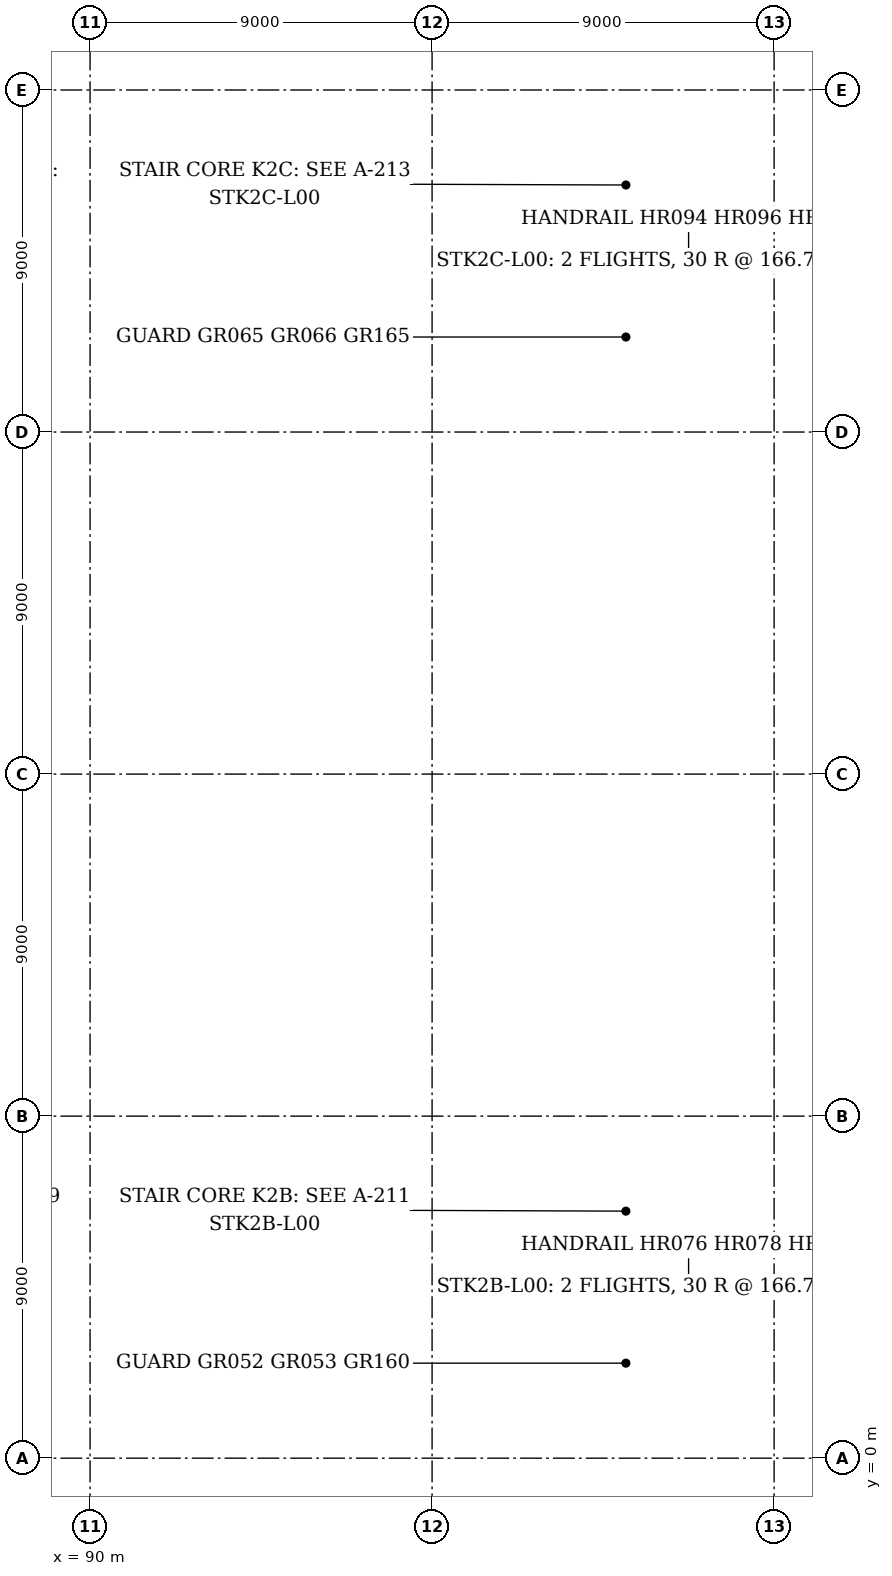
"""IFC4 building model, lengths in metres.
Left out: names, types, materials, properties, quantities, classifications, styles, units other than length and angle.
Written with IfcOpenShell. Run it as: python <this file> out.ifc"""

import sys

from ifc_helpers import new_model, si_unit, direction, frame, frame_2d, origin, origin_2d, place, context, subcontext, project, spatial, rectangle, hollow_rectangle, hollow_circle, i_section, extrude, element, fill, save


model = new_model("IFC4")
c1 = context("Model", 3, precision=1e-05, world=origin(), true_north=direction((0.0, 1.0)))
c2 = subcontext(c1, "Body", "Model", "MODEL_VIEW")
j1 = project(units=[si_unit("LENGTHUNIT", "METRE"), si_unit("PLANEANGLEUNIT", "RADIAN")], contexts=[c1])
p1 = place(None, origin())
s1 = spatial("IfcSite", under=j1, at=p1, CompositionType="ELEMENT")
p2 = place(p1, origin())
s2 = spatial("IfcBuilding", under=s1, at=p2, CompositionType="ELEMENT")
p3 = place(p2, origin())
s3 = spatial("IfcBuildingStorey", under=s2, at=p3, CompositionType="ELEMENT", Elevation=0.0)
p4 = place(p3, frame((90.0, 0.0, 0.0), z_axis=(0.0, 0.0, 1.0), x_axis=(1.0, 0.0, 0.0)))
e1 = element("IfcColumn", 1, at=p4, inside=s3, PredefinedType="COLUMN", context=c2, shape_type="SweptSolid", body=[
    extrude(hollow_rectangle(XDim=0.3, YDim=0.3, WallThickness=0.016, InnerFilletRadius=0.024, OuterFilletRadius=0.04, at=origin_2d()), origin(), (0.0, 0.0, 1.0), 5.0),
])
p5 = place(p3, frame((99.0, 0.0, 0.0), z_axis=(0.0, 0.0, 1.0), x_axis=(1.0, 0.0, 0.0)))
e2 = element("IfcColumn", 2, at=p5, inside=s3, PredefinedType="COLUMN", context=c2, shape_type="SweptSolid", body=[
    extrude(hollow_rectangle(XDim=0.35, YDim=0.35, WallThickness=0.016, InnerFilletRadius=0.024, OuterFilletRadius=0.04, at=origin_2d()), origin(), (0.0, 0.0, 1.0), 5.0),
])
for number, where, z_axis, x_axis in (
    (3, (90.0, 9.0, 0.0), (0.0, 0.0, 1.0), (1.0, 0.0, 0.0)),
    (4, (99.0, 9.0, 0.0), (0.0, 0.0, 1.0), (1.0, 0.0, 0.0)),
    (5, (99.0, 18.0, 0.0), (0.0, 0.0, 1.0), (1.0, 0.0, 0.0)),
):
    element("IfcColumn", number, at=place(p3, frame(where, z_axis=z_axis, x_axis=x_axis)), inside=s3, PredefinedType="COLUMN", context=c2, shape_type="SweptSolid", body=[
        extrude(hollow_circle(Radius=0.203, WallThickness=0.013, at=origin_2d()), origin(), (0.0, 0.0, 1.0), 5.0),
    ])
p6 = place(p3, frame((108.0, 18.0, 0.0), z_axis=(0.0, 0.0, 1.0), x_axis=(1.0, 0.0, 0.0)))
e6 = element("IfcColumn", 6, at=p6, inside=s3, PredefinedType="COLUMN", context=c2, shape_type="SweptSolid", body=[
    extrude(hollow_rectangle(XDim=0.35, YDim=0.35, WallThickness=0.016, InnerFilletRadius=0.024, OuterFilletRadius=0.04, at=origin_2d()), origin(), (0.0, 0.0, 1.0), 5.0),
])
for number, where, z_axis, x_axis in (
    (7, (90.0, 27.0, 0.0), (0.0, 0.0, 1.0), (1.0, 0.0, 0.0)),
    (8, (99.0, 27.0, 0.0), (0.0, 0.0, 1.0), (1.0, 0.0, 0.0)),
):
    element("IfcColumn", number, at=place(p3, frame(where, z_axis=z_axis, x_axis=x_axis)), inside=s3, PredefinedType="COLUMN", context=c2, shape_type="SweptSolid", body=[
        extrude(hollow_circle(Radius=0.203, WallThickness=0.013, at=origin_2d()), origin(), (0.0, 0.0, 1.0), 5.0),
    ])
p7 = place(p3, frame((90.0, 36.0, 0.0), z_axis=(0.0, 0.0, 1.0), x_axis=(1.0, 0.0, 0.0)))
e9 = element("IfcColumn", 9, at=p7, inside=s3, PredefinedType="COLUMN", context=c2, shape_type="SweptSolid", body=[
    extrude(i_section(OverallWidth=0.311, OverallDepth=0.327, WebThickness=0.016, FlangeThickness=0.025, FilletRadius=0.017, at=origin_2d()), origin(), (0.0, 0.0, 1.0), 5.0),
])
p8 = place(p3, frame((99.0, 36.0, 0.0), z_axis=(0.0, 0.0, 1.0), x_axis=(1.0, 0.0, 0.0)))
e10 = element("IfcColumn", 10, at=p8, inside=s3, PredefinedType="COLUMN", context=c2, shape_type="SweptSolid", body=[
    extrude(i_section(OverallWidth=0.35, OverallDepth=0.339, WebThickness=0.025, FlangeThickness=0.032, at=origin_2d()), origin(), (0.0, 0.0, 1.0), 5.0),
])
p9 = place(p3, frame((107.935, 36.0, 0.0), z_axis=(0.0, 0.0, 1.0), x_axis=(0.0, 1.0, 0.0)))
e11 = element("IfcWall", 11, at=p9, inside=s3, PredefinedType="SOLIDWALL", context=c2, shape_type="SweptSolid", body=[
    extrude(rectangle(XDim=8.85, YDim=0.25, at=frame_2d((4.425, 0.0))), origin(), (0.0, 0.0, 1.0), 4.05),
])
p10 = place(p3, frame((107.85, 10.562, 0.0), z_axis=(0.0, 0.0, 1.0), x_axis=(0.0, 1.0, 0.0)))
e12 = element("IfcWall", 12, at=p10, inside=s3, PredefinedType="SOLIDWALL", context=c2, shape_type="SweptSolid", body=[
    extrude(rectangle(XDim=5.7, YDim=0.2, at=frame_2d((2.85, 0.0))), origin(), (0.0, 0.0, 1.0), 4.835),
])
p11 = place(p10, frame((0.3, 0.0, 0.0)))
e13 = element("IfcOpeningElement", 13, at=p11, cuts=e12, PredefinedType="OPENING", context=c2, shape_type="SweptSolid", body=[
    extrude(rectangle(XDim=2.4, YDim=2.4, at=frame_2d((1.2, 1.2))), frame((0.0, 0.11, 0.0), z_axis=(0.0, -1.0, 0.0), x_axis=(1.0, 0.0, 0.0)), (0.0, 0.0, 1.0), 0.22),
])
p12 = place(p10, frame((3.0, 0.0, 0.0)))
e14 = element("IfcOpeningElement", 14, at=p12, cuts=e12, PredefinedType="OPENING", context=c2, shape_type="SweptSolid", body=[
    extrude(rectangle(XDim=2.4, YDim=2.4, at=frame_2d((1.2, 1.2))), frame((0.0, 0.11, 0.0), z_axis=(0.0, -1.0, 0.0), x_axis=(1.0, 0.0, 0.0)), (0.0, 0.0, 1.0), 0.22),
])
p13 = place(p3, frame((103.5, 0.15, 0.0), z_axis=(0.0, 0.0, 1.0), x_axis=(1.0, 0.0, 0.0)))
e15 = element("IfcWall", 15, at=p13, inside=s3, PredefinedType="SOLIDWALL", context=c2, shape_type="SweptSolid", body=[
    extrude(rectangle(XDim=4.5, YDim=0.3, at=frame_2d((2.25, 0.0))), origin(), (0.0, 0.0, 1.0), 5.0),
])
p14 = place(p3, frame((107.85, 0.3, 0.0), z_axis=(0.0, 0.0, 1.0), x_axis=(0.0, 1.0, 0.0)))
e16 = element("IfcWall", 16, at=p14, inside=s3, PredefinedType="SOLIDWALL", context=c2, shape_type="SweptSolid", body=[
    extrude(rectangle(XDim=8.4, YDim=0.3, at=frame_2d((4.2, 0.0))), origin(), (0.0, 0.0, 1.0), 5.0),
])
p15 = place(p14, frame((3.25, 0.0, 0.0)))
e17 = element("IfcOpeningElement", 17, at=p15, cuts=e16, PredefinedType="OPENING", context=c2, shape_type="SweptSolid", body=[
    extrude(rectangle(XDim=1.8, YDim=2.1, at=frame_2d((0.9, 1.05))), frame((0.0, 0.16, 0.0), z_axis=(0.0, -1.0, 0.0), x_axis=(1.0, 0.0, 0.0)), (0.0, 0.0, 1.0), 0.32),
])
p16 = place(p3, frame((103.5, 8.85, 0.0), z_axis=(0.0, 0.0, 1.0), x_axis=(1.0, 0.0, 0.0)))
e18 = element("IfcWall", 18, at=p16, inside=s3, PredefinedType="SOLIDWALL", context=c2, shape_type="SweptSolid", body=[
    extrude(rectangle(XDim=4.5, YDim=0.3, at=frame_2d((2.25, 0.0))), origin(), (0.0, 0.0, 1.0), 5.0),
])
p17 = place(p16, frame((2.95, 0.0, 0.0)))
e19 = element("IfcOpeningElement", 19, at=p17, cuts=e18, PredefinedType="OPENING", context=c2, shape_type="SweptSolid", body=[
    extrude(rectangle(XDim=1.2, YDim=2.1, at=frame_2d((0.6, 1.05))), frame((0.0, 0.16, 0.0), z_axis=(0.0, -1.0, 0.0), x_axis=(1.0, 0.0, 0.0)), (0.0, 0.0, 1.0), 0.32),
])
p18 = place(p3, frame((103.65, 0.3, 0.0), z_axis=(0.0, 0.0, 1.0), x_axis=(0.0, 1.0, 0.0)))
e20 = element("IfcWall", 20, at=p18, inside=s3, PredefinedType="SOLIDWALL", context=c2, shape_type="SweptSolid", body=[
    extrude(rectangle(XDim=8.4, YDim=0.3, at=frame_2d((4.2, 0.0))), origin(), (0.0, 0.0, 1.0), 5.0),
])
p19 = place(p3, frame((103.5, 27.15, 0.0), z_axis=(0.0, 0.0, 1.0), x_axis=(1.0, 0.0, 0.0)))
e21 = element("IfcWall", 21, at=p19, inside=s3, PredefinedType="SOLIDWALL", context=c2, shape_type="SweptSolid", body=[
    extrude(rectangle(XDim=4.5, YDim=0.3, at=frame_2d((2.25, 0.0))), origin(), (0.0, 0.0, 1.0), 5.0),
])
p20 = place(p3, frame((107.85, 27.3, 0.0), z_axis=(0.0, 0.0, 1.0), x_axis=(0.0, 1.0, 0.0)))
e22 = element("IfcWall", 22, at=p20, inside=s3, PredefinedType="SOLIDWALL", context=c2, shape_type="SweptSolid", body=[
    extrude(rectangle(XDim=8.4, YDim=0.3, at=frame_2d((4.2, 0.0))), origin(), (0.0, 0.0, 1.0), 5.0),
])
p21 = place(p20, frame((3.25, 0.0, 0.0)))
e23 = element("IfcOpeningElement", 23, at=p21, cuts=e22, PredefinedType="OPENING", context=c2, shape_type="SweptSolid", body=[
    extrude(rectangle(XDim=1.8, YDim=2.1, at=frame_2d((0.9, 1.05))), frame((0.0, 0.16, 0.0), z_axis=(0.0, -1.0, 0.0), x_axis=(1.0, 0.0, 0.0)), (0.0, 0.0, 1.0), 0.32),
])
p22 = place(p3, frame((103.5, 35.85, 0.0), z_axis=(0.0, 0.0, 1.0), x_axis=(1.0, 0.0, 0.0)))
e24 = element("IfcWall", 24, at=p22, inside=s3, PredefinedType="SOLIDWALL", context=c2, shape_type="SweptSolid", body=[
    extrude(rectangle(XDim=4.5, YDim=0.3, at=frame_2d((2.25, 0.0))), origin(), (0.0, 0.0, 1.0), 5.0),
])
p23 = place(p22, frame((1.35, 0.0, 0.0)))
e25 = element("IfcOpeningElement", 25, at=p23, cuts=e24, PredefinedType="OPENING", context=c2, shape_type="SweptSolid", body=[
    extrude(rectangle(XDim=1.8, YDim=2.1, at=frame_2d((0.9, 1.05))), frame((0.0, 0.16, 0.0), z_axis=(0.0, -1.0, 0.0), x_axis=(1.0, 0.0, 0.0)), (0.0, 0.0, 1.0), 0.32),
])
p24 = place(p3, frame((103.65, 27.3, 0.0), z_axis=(0.0, 0.0, 1.0), x_axis=(0.0, 1.0, 0.0)))
e26 = element("IfcWall", 26, at=p24, inside=s3, PredefinedType="SOLIDWALL", context=c2, shape_type="SweptSolid", body=[
    extrude(rectangle(XDim=8.4, YDim=0.3, at=frame_2d((4.2, 0.0))), origin(), (0.0, 0.0, 1.0), 5.0),
])
p25 = place(p3, frame((93.0, 9.0, 0.0), z_axis=(0.0, 0.0, 1.0), x_axis=(1.0, 0.0, 0.0)))
e27 = element("IfcWall", 27, at=p25, inside=s3, PredefinedType="PARTITIONING", context=c2, shape_type="SweptSolid", body=[
    extrude(rectangle(XDim=3.0, YDim=0.125, at=frame_2d((1.5, 0.0))), origin(), (0.0, 0.0, 1.0), 4.228),
])
p26 = place(p3, frame((93.0, 27.0, 0.0), z_axis=(0.0, 0.0, 1.0), x_axis=(1.0, 0.0, 0.0)))
e28 = element("IfcWall", 28, at=p26, inside=s3, PredefinedType="PARTITIONING", context=c2, shape_type="SweptSolid", body=[
    extrude(rectangle(XDim=3.0, YDim=0.15, at=frame_2d((1.5, 0.0))), origin(), (0.0, 0.0, 1.0), 4.228),
])
p27 = place(p26, frame((0.95, 0.0, 0.0)))
e29 = element("IfcOpeningElement", 29, at=p27, cuts=e28, PredefinedType="OPENING", context=c2, shape_type="SweptSolid", body=[
    extrude(rectangle(XDim=1.0, YDim=2.1, at=frame_2d((0.5, 1.05))), frame((0.0, 0.085, 0.0), z_axis=(0.0, -1.0, 0.0), x_axis=(1.0, 0.0, 0.0)), (0.0, 0.0, 1.0), 0.17),
])
p28 = place(p3, frame((81.203, 27.0, 0.0), z_axis=(0.0, 0.0, 1.0), x_axis=(1.0, 0.0, 0.0)))
e30 = element("IfcWall", 30, at=p28, inside=s3, PredefinedType="PARTITIONING", context=c2, shape_type="SweptSolid", body=[
    extrude(rectangle(XDim=8.594, YDim=0.125, at=frame_2d((4.297, 0.0))), origin(), (0.0, 0.0, 1.0), 4.228),
])
p29 = place(p28, frame((3.75, 0.0, 0.0)))
e31 = element("IfcOpeningElement", 31, at=p29, cuts=e30, PredefinedType="OPENING", context=c2, shape_type="SweptSolid", body=[
    extrude(rectangle(XDim=1.0, YDim=2.1, at=frame_2d((0.5, 1.05))), frame((0.0, 0.073, 0.0), z_axis=(0.0, -1.0, 0.0), x_axis=(1.0, 0.0, 0.0)), (0.0, 0.0, 1.0), 0.145),
])
p30 = place(p3, frame((99.203, 9.0, 0.0), z_axis=(0.0, 0.0, 1.0), x_axis=(1.0, 0.0, 0.0)))
e32 = element("IfcWall", 32, at=p30, inside=s3, PredefinedType="PARTITIONING", context=c2, shape_type="SweptSolid", body=[
    extrude(rectangle(XDim=4.297, YDim=0.2, at=frame_2d((2.148, 0.0))), origin(), (0.0, 0.0, 1.0), 4.302),
])
p31 = place(p30, frame((1.25, 0.0, 0.0)))
e33 = element("IfcOpeningElement", 33, at=p31, cuts=e32, PredefinedType="OPENING", context=c2, shape_type="SweptSolid", body=[
    extrude(rectangle(XDim=1.8, YDim=2.1, at=frame_2d((0.9, 1.05))), frame((0.0, 0.11, 0.0), z_axis=(0.0, -1.0, 0.0), x_axis=(1.0, 0.0, 0.0)), (0.0, 0.0, 1.0), 0.22),
])
p32 = place(p3, frame((99.0, 0.175, 0.0), z_axis=(0.0, 0.0, 1.0), x_axis=(0.0, 1.0, 0.0)))
e34 = element("IfcWall", 34, at=p32, inside=s3, PredefinedType="PARTITIONING", context=c2, shape_type="SweptSolid", body=[
    extrude(rectangle(XDim=8.622, YDim=0.2, at=frame_2d((4.311, 0.0))), origin(), (0.0, 0.0, 1.0), 4.302),
])
p33 = place(p3, frame((99.0, 30.017, 0.0), z_axis=(0.0, 0.0, 1.0), x_axis=(0.0, 1.0, 0.0)))
e35 = element("IfcWall", 35, at=p33, inside=s3, PredefinedType="PARTITIONING", context=c2, shape_type="SweptSolid", body=[
    extrude(rectangle(XDim=3.0, YDim=0.15, at=frame_2d((1.5, 0.0))), origin(), (0.0, 0.0, 1.0), 4.302),
])
p34 = place(p3, frame((90.156, 36.0, 0.0), z_axis=(0.0, 0.0, 1.0), x_axis=(1.0, 0.0, 0.0)))
e36 = element("IfcWall", 36, at=p34, inside=s3, PredefinedType="PARTITIONING", context=c2, shape_type="SweptSolid", body=[
    extrude(rectangle(XDim=8.669, YDim=0.15, at=frame_2d((4.335, 0.0))), origin(), (0.0, 0.0, 1.0), 3.958),
])
p35 = place(p3, frame((90.0, 27.203, 0.0), z_axis=(0.0, 0.0, 1.0), x_axis=(0.0, 1.0, 0.0)))
e37 = element("IfcWall", 37, at=p35, inside=s3, PredefinedType="PARTITIONING", context=c2, shape_type="SweptSolid", body=[
    extrude(rectangle(XDim=1.597, YDim=0.125, at=frame_2d((0.798, 0.0))), origin(), (0.0, 0.0, 1.0), 4.302),
])
p36 = place(p3, frame((90.0, 28.8, 0.0), z_axis=(0.0, 0.0, 1.0), x_axis=(0.0, 1.0, 0.0)))
e38 = element("IfcWall", 38, at=p36, inside=s3, PredefinedType="PARTITIONING", context=c2, shape_type="SweptSolid", body=[
    extrude(rectangle(XDim=7.036, YDim=0.075, at=frame_2d((3.518, 0.0))), origin(), (0.0, 0.0, 1.0), 4.302),
])
p37 = place(p3, frame((99.175, 36.0, 0.0), z_axis=(0.0, 0.0, 1.0), x_axis=(1.0, 0.0, 0.0)))
e39 = element("IfcWall", 39, at=p37, inside=s3, PredefinedType="PARTITIONING", context=c2, shape_type="SweptSolid", body=[
    extrude(rectangle(XDim=4.325, YDim=0.15, at=frame_2d((2.163, 0.0))), origin(), (0.0, 0.0, 1.0), 3.958),
])
p38 = place(p3, frame((87.0, 36.0, 0.0), z_axis=(0.0, 0.0, 1.0), x_axis=(1.0, 0.0, 0.0)))
e40 = element("IfcWall", 40, at=p38, inside=s3, PredefinedType="PARTITIONING", context=c2, shape_type="SweptSolid", body=[
    extrude(rectangle(XDim=2.844, YDim=0.15, at=frame_2d((1.422, 0.0))), origin(), (0.0, 0.0, 1.0), 3.958),
])
p39 = place(p3, frame((87.0, 28.8, 0.0), z_axis=(0.0, 0.0, 1.0), x_axis=(1.0, 0.0, 0.0)))
e41 = element("IfcWall", 41, at=p39, inside=s3, PredefinedType="PARTITIONING", context=c2, shape_type="SweptSolid", body=[
    extrude(rectangle(XDim=3.0, YDim=0.075, at=frame_2d((1.5, 0.0))), origin(), (0.0, 0.0, 1.0), 4.302),
])
p40 = place(p39, frame((0.95, 0.0, 0.0)))
e42 = element("IfcOpeningElement", 42, at=p40, cuts=e41, PredefinedType="OPENING", context=c2, shape_type="SweptSolid", body=[
    extrude(rectangle(XDim=1.0, YDim=2.1, at=frame_2d((0.5, 1.05))), frame((0.0, 0.047, 0.0), z_axis=(0.0, -1.0, 0.0), x_axis=(1.0, 0.0, 0.0)), (0.0, 0.0, 1.0), 0.095),
])
p41 = place(p11, frame((2.4, 0.0, 0.0), z_axis=(0.0, 0.0, 1.0), x_axis=(-1.0, 0.0, 0.0)))
e43 = element("IfcDoor", 43, at=p41, inside=s3, OperationType="DOUBLE_DOOR_SINGLE_SWING", PredefinedType="DOOR", context=c2, shape_type="SweptSolid", body=[
    extrude(rectangle(XDim=2.4, YDim=2.4, at=frame_2d((1.2, 1.2))), frame((0.0, 0.025, 0.0), z_axis=(0.0, -1.0, 0.0), x_axis=(1.0, 0.0, 0.0)), (0.0, 0.0, 1.0), 0.05),
])
fill(e13, e43)
p42 = place(p12, frame((2.4, 0.0, 0.0), z_axis=(0.0, 0.0, 1.0), x_axis=(-1.0, 0.0, 0.0)))
e44 = element("IfcDoor", 44, at=p42, inside=s3, OperationType="DOUBLE_DOOR_SINGLE_SWING", PredefinedType="DOOR", context=c2, shape_type="SweptSolid", body=[
    extrude(rectangle(XDim=2.4, YDim=2.4, at=frame_2d((1.2, 1.2))), frame((0.0, 0.025, 0.0), z_axis=(0.0, -1.0, 0.0), x_axis=(1.0, 0.0, 0.0)), (0.0, 0.0, 1.0), 0.05),
])
fill(e14, e44)
p43 = place(p15, frame((1.8, 0.0, 0.0), z_axis=(0.0, 0.0, 1.0), x_axis=(-1.0, 0.0, 0.0)))
e45 = element("IfcDoor", 45, at=p43, inside=s3, OperationType="DOUBLE_DOOR_SINGLE_SWING", PredefinedType="DOOR", context=c2, shape_type="SweptSolid", body=[
    extrude(rectangle(XDim=1.8, YDim=2.1, at=frame_2d((0.9, 1.05))), frame((0.0, 0.025, 0.0), z_axis=(0.0, -1.0, 0.0), x_axis=(1.0, 0.0, 0.0)), (0.0, 0.0, 1.0), 0.05),
])
fill(e17, e45)
p44 = place(p17, frame((1.2, 0.0, 0.0), z_axis=(0.0, 0.0, 1.0), x_axis=(-1.0, 0.0, 0.0)))
e46 = element("IfcDoor", 46, at=p44, inside=s3, OperationType="SINGLE_SWING_RIGHT", PredefinedType="DOOR", context=c2, shape_type="SweptSolid", body=[
    extrude(rectangle(XDim=1.2, YDim=2.1, at=frame_2d((0.6, 1.05))), frame((0.0, 0.025, 0.0), z_axis=(0.0, -1.0, 0.0), x_axis=(1.0, 0.0, 0.0)), (0.0, 0.0, 1.0), 0.05),
])
fill(e19, e46)
p45 = place(p21, frame((1.8, 0.0, 0.0), z_axis=(0.0, 0.0, 1.0), x_axis=(-1.0, 0.0, 0.0)))
e47 = element("IfcDoor", 47, at=p45, inside=s3, OperationType="DOUBLE_DOOR_SINGLE_SWING", PredefinedType="DOOR", context=c2, shape_type="SweptSolid", body=[
    extrude(rectangle(XDim=1.8, YDim=2.1, at=frame_2d((0.9, 1.05))), frame((0.0, 0.025, 0.0), z_axis=(0.0, -1.0, 0.0), x_axis=(1.0, 0.0, 0.0)), (0.0, 0.0, 1.0), 0.05),
])
fill(e23, e47)
p46 = place(p23, frame((1.8, 0.0, 0.0), z_axis=(0.0, 0.0, 1.0), x_axis=(-1.0, 0.0, 0.0)))
e48 = element("IfcDoor", 48, at=p46, inside=s3, OperationType="DOUBLE_DOOR_SINGLE_SWING", PredefinedType="DOOR", context=c2, shape_type="SweptSolid", body=[
    extrude(rectangle(XDim=1.8, YDim=2.1, at=frame_2d((0.9, 1.05))), frame((0.0, 0.025, 0.0), z_axis=(0.0, -1.0, 0.0), x_axis=(1.0, 0.0, 0.0)), (0.0, 0.0, 1.0), 0.05),
])
fill(e25, e48)
p47 = place(p31, frame((1.8, 0.0, 0.0), z_axis=(0.0, 0.0, 1.0), x_axis=(-1.0, 0.0, 0.0)))
e49 = element("IfcDoor", 49, at=p47, inside=s3, OperationType="DOUBLE_DOOR_SINGLE_SWING", PredefinedType="DOOR", context=c2, shape_type="SweptSolid", body=[
    extrude(rectangle(XDim=1.8, YDim=2.1, at=frame_2d((0.9, 1.05))), frame((0.0, 0.025, 0.0), z_axis=(0.0, -1.0, 0.0), x_axis=(1.0, 0.0, 0.0)), (0.0, 0.0, 1.0), 0.05),
])
fill(e33, e49)
p48 = place(p27, origin())
e50 = element("IfcDoor", 50, at=p48, inside=s3, OperationType="SINGLE_SWING_LEFT", PredefinedType="DOOR", context=c2, shape_type="SweptSolid", body=[
    extrude(rectangle(XDim=1.0, YDim=2.1, at=frame_2d((0.5, 1.05))), frame((0.0, 0.025, 0.0), z_axis=(0.0, -1.0, 0.0), x_axis=(1.0, 0.0, 0.0)), (0.0, 0.0, 1.0), 0.05),
])
fill(e29, e50)
save(model, sys.argv[1])
